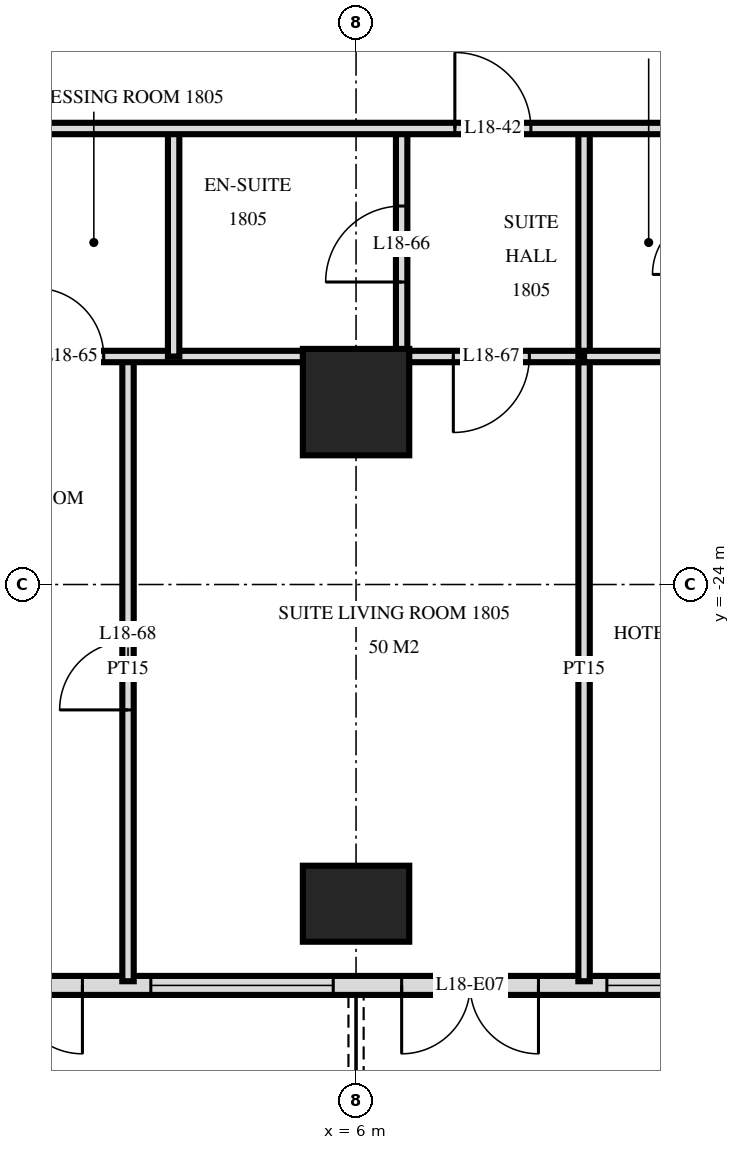
"""IFC4 building model, lengths in metres.
Left out: names, types, materials, properties, quantities, classifications, styles, units other than length and angle.
Written with IfcOpenShell. Run it as: python <this file> out.ifc"""

import sys

from ifc_helpers import new_model, si_unit, direction, frame, frame_2d, origin, origin_2d, place, context, subcontext, project, spatial, rectangle, extrude, element, fill, save


model = new_model("IFC4")
c1 = context("Model", 3, precision=1e-05, world=origin(), true_north=direction((0.0, 1.0)))
c2 = subcontext(c1, "Body", "Model", "MODEL_VIEW")
j1 = project(units=[si_unit("LENGTHUNIT", "METRE"), si_unit("PLANEANGLEUNIT", "RADIAN")], contexts=[c1])
p1 = place(None, origin())
s1 = spatial("IfcSite", under=j1, at=p1, CompositionType="ELEMENT")
p2 = place(p1, origin())
s2 = spatial("IfcBuilding", under=s1, at=p2, CompositionType="ELEMENT")
p3 = place(p2, frame((0.0, 0.0, 74.4)))
s3 = spatial("IfcBuildingStorey", under=s2, at=p3, CompositionType="ELEMENT", Elevation=74.4)
p4 = place(p3, frame((6.0, -28.2, 0.0), z_axis=(0.0, 0.0, 1.0), x_axis=(1.0, 0.0, 0.0)))
e1 = element("IfcColumn", 1, at=p4, inside=s3, PredefinedType="COLUMN", context=c2, shape_type="SweptSolid", body=[
    extrude(rectangle(XDim=1.4, YDim=1.0, at=origin_2d()), origin(), (0.0, 0.0, 1.0), 3.6),
])
p5 = place(p3, frame((6.0, -21.6, 0.0), z_axis=(0.0, 0.0, 1.0), x_axis=(1.0, 0.0, 0.0)))
e2 = element("IfcColumn", 2, at=p5, inside=s3, PredefinedType="COLUMN", context=c2, shape_type="SweptSolid", body=[
    extrude(rectangle(XDim=1.4, YDim=1.4, at=origin_2d()), origin(), (0.0, 0.0, 1.0), 3.6),
])
p6 = place(p3, frame((-28.775, -29.275, 0.0), z_axis=(0.0, 0.0, 1.0), x_axis=(1.0, 0.0, 0.0)))
e3 = element("IfcWall", 3, at=p6, inside=s3, PredefinedType="SOLIDWALL", context=c2, shape_type="SweptSolid", body=[
    extrude(rectangle(XDim=57.551, YDim=0.25, at=frame_2d((28.775, 0.0))), origin(), (0.0, 0.0, 1.0), 3.32),
])
p7 = place(p6, frame((0.575, 0.0, 0.0)))
e4 = element("IfcOpeningElement", 4, at=p7, cuts=e3, PredefinedType="OPENING", context=c2, shape_type="SweptSolid", body=[
    extrude(rectangle(XDim=1.8, YDim=2.4, at=frame_2d((0.9, 1.2))), frame((0.0, 0.135, 0.0), z_axis=(0.0, -1.0, 0.0), x_axis=(1.0, 0.0, 0.0)), (0.0, 0.0, 1.0), 0.27),
])
p8 = place(p6, frame((5.075, 0.0, 0.3)))
e5 = element("IfcOpeningElement", 5, at=p8, cuts=e3, PredefinedType="OPENING", context=c2, shape_type="SweptSolid", body=[
    extrude(rectangle(XDim=2.4, YDim=2.1, at=frame_2d((1.2, 1.05))), frame((0.0, 0.135, 0.0), z_axis=(0.0, -1.0, 0.0), x_axis=(1.0, 0.0, 0.0)), (0.0, 0.0, 1.0), 0.27),
])
p9 = place(p6, frame((8.375, 0.0, 0.0)))
e6 = element("IfcOpeningElement", 6, at=p9, cuts=e3, PredefinedType="OPENING", context=c2, shape_type="SweptSolid", body=[
    extrude(rectangle(XDim=1.8, YDim=2.4, at=frame_2d((0.9, 1.2))), frame((0.0, 0.135, 0.0), z_axis=(0.0, -1.0, 0.0), x_axis=(1.0, 0.0, 0.0)), (0.0, 0.0, 1.0), 0.27),
])
p10 = place(p6, frame((11.375, 0.0, 0.0)))
e7 = element("IfcOpeningElement", 7, at=p10, cuts=e3, PredefinedType="OPENING", context=c2, shape_type="SweptSolid", body=[
    extrude(rectangle(XDim=1.8, YDim=2.4, at=frame_2d((0.9, 1.2))), frame((0.0, 0.135, 0.0), z_axis=(0.0, -1.0, 0.0), x_axis=(1.0, 0.0, 0.0)), (0.0, 0.0, 1.0), 0.27),
])
p11 = place(p6, frame((14.075, 0.0, 0.3)))
e8 = element("IfcOpeningElement", 8, at=p11, cuts=e3, PredefinedType="OPENING", context=c2, shape_type="SweptSolid", body=[
    extrude(rectangle(XDim=2.4, YDim=2.1, at=frame_2d((1.2, 1.05))), frame((0.0, 0.135, 0.0), z_axis=(0.0, -1.0, 0.0), x_axis=(1.0, 0.0, 0.0)), (0.0, 0.0, 1.0), 0.27),
])
p12 = place(p6, frame((17.375, 0.0, 0.0)))
e9 = element("IfcOpeningElement", 9, at=p12, cuts=e3, PredefinedType="OPENING", context=c2, shape_type="SweptSolid", body=[
    extrude(rectangle(XDim=1.8, YDim=2.4, at=frame_2d((0.9, 1.2))), frame((0.0, 0.135, 0.0), z_axis=(0.0, -1.0, 0.0), x_axis=(1.0, 0.0, 0.0)), (0.0, 0.0, 1.0), 0.27),
])
p13 = place(p6, frame((20.075, 0.0, 0.3)))
e10 = element("IfcOpeningElement", 10, at=p13, cuts=e3, PredefinedType="OPENING", context=c2, shape_type="SweptSolid", body=[
    extrude(rectangle(XDim=2.4, YDim=2.1, at=frame_2d((1.2, 1.05))), frame((0.0, 0.135, 0.0), z_axis=(0.0, -1.0, 0.0), x_axis=(1.0, 0.0, 0.0)), (0.0, 0.0, 1.0), 0.27),
])
p14 = place(p6, frame((23.075, 0.0, 0.3)))
e11 = element("IfcOpeningElement", 11, at=p14, cuts=e3, PredefinedType="OPENING", context=c2, shape_type="SweptSolid", body=[
    extrude(rectangle(XDim=2.4, YDim=2.1, at=frame_2d((1.2, 1.05))), frame((0.0, 0.135, 0.0), z_axis=(0.0, -1.0, 0.0), x_axis=(1.0, 0.0, 0.0)), (0.0, 0.0, 1.0), 0.27),
])
p15 = place(p6, frame((26.375, 0.0, 0.0)))
e12 = element("IfcOpeningElement", 12, at=p15, cuts=e3, PredefinedType="OPENING", context=c2, shape_type="SweptSolid", body=[
    extrude(rectangle(XDim=1.8, YDim=2.4, at=frame_2d((0.9, 1.2))), frame((0.0, 0.135, 0.0), z_axis=(0.0, -1.0, 0.0), x_axis=(1.0, 0.0, 0.0)), (0.0, 0.0, 1.0), 0.27),
])
p16 = place(p6, frame((29.375, 0.0, 0.0)))
e13 = element("IfcOpeningElement", 13, at=p16, cuts=e3, PredefinedType="OPENING", context=c2, shape_type="SweptSolid", body=[
    extrude(rectangle(XDim=1.8, YDim=2.4, at=frame_2d((0.9, 1.2))), frame((0.0, 0.135, 0.0), z_axis=(0.0, -1.0, 0.0), x_axis=(1.0, 0.0, 0.0)), (0.0, 0.0, 1.0), 0.27),
])
p17 = place(p6, frame((32.075, 0.0, 0.3)))
e14 = element("IfcOpeningElement", 14, at=p17, cuts=e3, PredefinedType="OPENING", context=c2, shape_type="SweptSolid", body=[
    extrude(rectangle(XDim=2.4, YDim=2.1, at=frame_2d((1.2, 1.05))), frame((0.0, 0.135, 0.0), z_axis=(0.0, -1.0, 0.0), x_axis=(1.0, 0.0, 0.0)), (0.0, 0.0, 1.0), 0.27),
])
p18 = place(p6, frame((35.375, 0.0, 0.0)))
e15 = element("IfcOpeningElement", 15, at=p18, cuts=e3, PredefinedType="OPENING", context=c2, shape_type="SweptSolid", body=[
    extrude(rectangle(XDim=1.8, YDim=2.4, at=frame_2d((0.9, 1.2))), frame((0.0, 0.135, 0.0), z_axis=(0.0, -1.0, 0.0), x_axis=(1.0, 0.0, 0.0)), (0.0, 0.0, 1.0), 0.27),
])
p19 = place(p6, frame((38.075, 0.0, 0.3)))
e16 = element("IfcOpeningElement", 16, at=p19, cuts=e3, PredefinedType="OPENING", context=c2, shape_type="SweptSolid", body=[
    extrude(rectangle(XDim=2.4, YDim=2.1, at=frame_2d((1.2, 1.05))), frame((0.0, 0.135, 0.0), z_axis=(0.0, -1.0, 0.0), x_axis=(1.0, 0.0, 0.0)), (0.0, 0.0, 1.0), 0.27),
])
p20 = place(p6, frame((41.075, 0.0, 0.3)))
e17 = element("IfcOpeningElement", 17, at=p20, cuts=e3, PredefinedType="OPENING", context=c2, shape_type="SweptSolid", body=[
    extrude(rectangle(XDim=2.4, YDim=2.1, at=frame_2d((1.2, 1.05))), frame((0.0, 0.135, 0.0), z_axis=(0.0, -1.0, 0.0), x_axis=(1.0, 0.0, 0.0)), (0.0, 0.0, 1.0), 0.27),
])
p21 = place(p6, frame((44.375, 0.0, 0.0)))
e18 = element("IfcOpeningElement", 18, at=p21, cuts=e3, PredefinedType="OPENING", context=c2, shape_type="SweptSolid", body=[
    extrude(rectangle(XDim=1.8, YDim=2.4, at=frame_2d((0.9, 1.2))), frame((0.0, 0.135, 0.0), z_axis=(0.0, -1.0, 0.0), x_axis=(1.0, 0.0, 0.0)), (0.0, 0.0, 1.0), 0.27),
])
p22 = place(p6, frame((47.075, 0.0, 0.3)))
e19 = element("IfcOpeningElement", 19, at=p22, cuts=e3, PredefinedType="OPENING", context=c2, shape_type="SweptSolid", body=[
    extrude(rectangle(XDim=2.4, YDim=2.1, at=frame_2d((1.2, 1.05))), frame((0.0, 0.135, 0.0), z_axis=(0.0, -1.0, 0.0), x_axis=(1.0, 0.0, 0.0)), (0.0, 0.0, 1.0), 0.27),
])
p23 = place(p6, frame((50.375, 0.0, 0.0)))
e20 = element("IfcOpeningElement", 20, at=p23, cuts=e3, PredefinedType="OPENING", context=c2, shape_type="SweptSolid", body=[
    extrude(rectangle(XDim=1.8, YDim=2.4, at=frame_2d((0.9, 1.2))), frame((0.0, 0.135, 0.0), z_axis=(0.0, -1.0, 0.0), x_axis=(1.0, 0.0, 0.0)), (0.0, 0.0, 1.0), 0.27),
])
p24 = place(p6, frame((53.375, 0.0, 0.0)))
e21 = element("IfcOpeningElement", 21, at=p24, cuts=e3, PredefinedType="OPENING", context=c2, shape_type="SweptSolid", body=[
    extrude(rectangle(XDim=1.8, YDim=2.4, at=frame_2d((0.9, 1.2))), frame((0.0, 0.135, 0.0), z_axis=(0.0, -1.0, 0.0), x_axis=(1.0, 0.0, 0.0)), (0.0, 0.0, 1.0), 0.27),
])
p25 = place(p3, frame((9.0, -21.0, 0.0), z_axis=(0.0, 0.0, 1.0), x_axis=(0.0, 1.0, 0.0)))
e22 = element("IfcWall", 22, at=p25, inside=s3, PredefinedType="PARTITIONING", context=c2, shape_type="SweptSolid", body=[
    extrude(rectangle(XDim=3.0, YDim=0.15, at=frame_2d((1.5, 0.0))), origin(), (0.0, 0.0, 1.0), 3.32),
])
p26 = place(p3, frame((9.0, -29.22, 0.0), z_axis=(0.0, 0.0, 1.0), x_axis=(0.0, 1.0, 0.0)))
e23 = element("IfcWall", 23, at=p26, inside=s3, PredefinedType="PARTITIONING", context=c2, shape_type="SweptSolid", body=[
    extrude(rectangle(XDim=8.22, YDim=0.15, at=frame_2d((4.11, 0.0))), origin(), (0.0, 0.0, 1.0), 3.32),
])
p27 = place(p3, frame((6.6, -21.0, 0.0), z_axis=(0.0, 0.0, 1.0), x_axis=(0.0, 1.0, 0.0)))
e24 = element("IfcWall", 24, at=p27, inside=s3, PredefinedType="PARTITIONING", context=c2, shape_type="SweptSolid", body=[
    extrude(rectangle(XDim=3.0, YDim=0.15, at=frame_2d((1.5, 0.0))), origin(), (0.0, 0.0, 1.0), 3.32),
])
p28 = place(p27, frame((0.98, 0.0, 0.0)))
e25 = element("IfcOpeningElement", 25, at=p28, cuts=e24, PredefinedType="OPENING", context=c2, shape_type="SweptSolid", body=[
    extrude(rectangle(XDim=1.0, YDim=2.1, at=frame_2d((0.5, 1.05))), frame((0.0, 0.085, 0.0), z_axis=(0.0, -1.0, 0.0), x_axis=(1.0, 0.0, 0.0)), (0.0, 0.0, 1.0), 0.17),
])
p29 = place(p3, frame((3.6, -21.0, 0.0), z_axis=(0.0, 0.0, 1.0), x_axis=(0.0, 1.0, 0.0)))
e26 = element("IfcWall", 26, at=p29, inside=s3, PredefinedType="PARTITIONING", context=c2, shape_type="SweptSolid", body=[
    extrude(rectangle(XDim=3.0, YDim=0.15, at=frame_2d((1.5, 0.0))), origin(), (0.0, 0.0, 1.0), 3.32),
])
p30 = place(p3, frame((3.0, -29.22, 0.0), z_axis=(0.0, 0.0, 1.0), x_axis=(0.0, 1.0, 0.0)))
e27 = element("IfcWall", 27, at=p30, inside=s3, PredefinedType="PARTITIONING", context=c2, shape_type="SweptSolid", body=[
    extrude(rectangle(XDim=8.22, YDim=0.15, at=frame_2d((4.11, 0.0))), origin(), (0.0, 0.0, 1.0), 3.32),
])
p31 = place(p30, frame((3.57, 0.0, 0.0)))
e28 = element("IfcOpeningElement", 28, at=p31, cuts=e27, PredefinedType="OPENING", context=c2, shape_type="SweptSolid", body=[
    extrude(rectangle(XDim=0.9, YDim=2.1, at=frame_2d((0.45, 1.05))), frame((0.0, 0.085, 0.0), z_axis=(0.0, -1.0, 0.0), x_axis=(1.0, 0.0, 0.0)), (0.0, 0.0, 1.0), 0.17),
])
p32 = place(p3, frame((6.6, -21.0, 0.0), z_axis=(0.0, 0.0, 1.0), x_axis=(1.0, 0.0, 0.0)))
e29 = element("IfcWall", 29, at=p32, inside=s3, PredefinedType="PARTITIONING", context=c2, shape_type="SweptSolid", body=[
    extrude(rectangle(XDim=2.4, YDim=0.15, at=frame_2d((1.2, 0.0))), origin(), (0.0, 0.0, 1.0), 3.32),
])
p33 = place(p32, frame((0.68, 0.0, 0.0)))
e30 = element("IfcOpeningElement", 30, at=p33, cuts=e29, PredefinedType="OPENING", context=c2, shape_type="SweptSolid", body=[
    extrude(rectangle(XDim=1.0, YDim=2.1, at=frame_2d((0.5, 1.05))), frame((0.0, 0.085, 0.0), z_axis=(0.0, -1.0, 0.0), x_axis=(1.0, 0.0, 0.0)), (0.0, 0.0, 1.0), 0.17),
])
p34 = place(p3, frame((1.5, -21.0, 0.0), z_axis=(0.0, 0.0, 1.0), x_axis=(1.0, 0.0, 0.0)))
e31 = element("IfcWall", 31, at=p34, inside=s3, PredefinedType="PARTITIONING", context=c2, shape_type="SweptSolid", body=[
    extrude(rectangle(XDim=5.1, YDim=0.15, at=frame_2d((2.55, 0.0))), origin(), (0.0, 0.0, 1.0), 3.32),
])
p35 = place(p34, frame((0.28, 0.0, 0.0)))
e32 = element("IfcOpeningElement", 32, at=p35, cuts=e31, PredefinedType="OPENING", context=c2, shape_type="SweptSolid", body=[
    extrude(rectangle(XDim=0.9, YDim=2.1, at=frame_2d((0.45, 1.05))), frame((0.0, 0.085, 0.0), z_axis=(0.0, -1.0, 0.0), x_axis=(1.0, 0.0, 0.0)), (0.0, 0.0, 1.0), 0.17),
])
p36 = place(p3, frame((9.0, -21.0, 0.0), z_axis=(0.0, 0.0, 1.0), x_axis=(1.0, 0.0, 0.0)))
e33 = element("IfcWall", 33, at=p36, inside=s3, PredefinedType="PARTITIONING", context=c2, shape_type="SweptSolid", body=[
    extrude(rectangle(XDim=1.7, YDim=0.15, at=frame_2d((0.85, 0.0))), origin(), (0.0, 0.0, 1.0), 3.32),
])
p37 = place(p3, frame((-33.12, -18.0, 0.0), z_axis=(0.0, 0.0, 1.0), x_axis=(1.0, 0.0, 0.0)))
e34 = element("IfcWall", 34, at=p37, inside=s3, PredefinedType="PARTITIONING", context=c2, shape_type="SweptSolid", body=[
    extrude(rectangle(XDim=66.24, YDim=0.15, at=frame_2d((33.12, 0.0))), origin(), (0.0, 0.0, 1.0), 3.32),
])
p38 = place(p37, frame((15.27, 0.0, 0.0)))
e35 = element("IfcOpeningElement", 35, at=p38, cuts=e34, PredefinedType="OPENING", context=c2, shape_type="SweptSolid", body=[
    extrude(rectangle(XDim=1.0, YDim=2.1, at=frame_2d((0.5, 1.05))), frame((0.0, 0.085, 0.0), z_axis=(0.0, -1.0, 0.0), x_axis=(1.0, 0.0, 0.0)), (0.0, 0.0, 1.0), 0.17),
])
p39 = place(p37, frame((21.22, 0.0, 0.0)))
e36 = element("IfcOpeningElement", 36, at=p39, cuts=e34, PredefinedType="OPENING", context=c2, shape_type="SweptSolid", body=[
    extrude(rectangle(XDim=1.0, YDim=2.1, at=frame_2d((0.5, 1.05))), frame((0.0, 0.085, 0.0), z_axis=(0.0, -1.0, 0.0), x_axis=(1.0, 0.0, 0.0)), (0.0, 0.0, 1.0), 0.17),
])
p40 = place(p37, frame((24.27, 0.0, 0.0)))
e37 = element("IfcOpeningElement", 37, at=p40, cuts=e34, PredefinedType="OPENING", context=c2, shape_type="SweptSolid", body=[
    extrude(rectangle(XDim=1.0, YDim=2.1, at=frame_2d((0.5, 1.05))), frame((0.0, 0.085, 0.0), z_axis=(0.0, -1.0, 0.0), x_axis=(1.0, 0.0, 0.0)), (0.0, 0.0, 1.0), 0.17),
])
p41 = place(p37, frame((30.97, 0.0, 0.0)))
e38 = element("IfcOpeningElement", 38, at=p41, cuts=e34, PredefinedType="OPENING", context=c2, shape_type="SweptSolid", body=[
    extrude(rectangle(XDim=1.0, YDim=2.1, at=frame_2d((0.5, 1.05))), frame((0.0, 0.085, 0.0), z_axis=(0.0, -1.0, 0.0), x_axis=(1.0, 0.0, 0.0)), (0.0, 0.0, 1.0), 0.17),
])
p42 = place(p37, frame((40.42, 0.0, 0.0)))
e39 = element("IfcOpeningElement", 39, at=p42, cuts=e34, PredefinedType="OPENING", context=c2, shape_type="SweptSolid", body=[
    extrude(rectangle(XDim=1.0, YDim=2.1, at=frame_2d((0.5, 1.05))), frame((0.0, 0.085, 0.0), z_axis=(0.0, -1.0, 0.0), x_axis=(1.0, 0.0, 0.0)), (0.0, 0.0, 1.0), 0.17),
])
p43 = place(p37, frame((43.97, 0.0, 0.0)))
e40 = element("IfcOpeningElement", 40, at=p43, cuts=e34, PredefinedType="OPENING", context=c2, shape_type="SweptSolid", body=[
    extrude(rectangle(XDim=1.0, YDim=2.1, at=frame_2d((0.5, 1.05))), frame((0.0, 0.085, 0.0), z_axis=(0.0, -1.0, 0.0), x_axis=(1.0, 0.0, 0.0)), (0.0, 0.0, 1.0), 0.17),
])
p44 = place(p37, frame((45.52, 0.0, 0.0)))
e41 = element("IfcOpeningElement", 41, at=p44, cuts=e34, PredefinedType="OPENING", context=c2, shape_type="SweptSolid", body=[
    extrude(rectangle(XDim=1.0, YDim=2.1, at=frame_2d((0.5, 1.05))), frame((0.0, 0.085, 0.0), z_axis=(0.0, -1.0, 0.0), x_axis=(1.0, 0.0, 0.0)), (0.0, 0.0, 1.0), 0.17),
])
p45 = place(p37, frame((52.97, 0.0, 0.0)))
e42 = element("IfcOpeningElement", 42, at=p45, cuts=e34, PredefinedType="OPENING", context=c2, shape_type="SweptSolid", body=[
    extrude(rectangle(XDim=1.0, YDim=2.1, at=frame_2d((0.5, 1.05))), frame((0.0, 0.085, 0.0), z_axis=(0.0, -1.0, 0.0), x_axis=(1.0, 0.0, 0.0)), (0.0, 0.0, 1.0), 0.17),
])
p46 = place(p37, frame((54.27, 0.0, 0.0)))
e43 = element("IfcOpeningElement", 43, at=p46, cuts=e34, PredefinedType="OPENING", context=c2, shape_type="SweptSolid", body=[
    extrude(rectangle(XDim=1.0, YDim=2.1, at=frame_2d((0.5, 1.05))), frame((0.0, 0.085, 0.0), z_axis=(0.0, -1.0, 0.0), x_axis=(1.0, 0.0, 0.0)), (0.0, 0.0, 1.0), 0.17),
])
p47 = place(p37, frame((13.42, 0.0, 0.0)))
e44 = element("IfcOpeningElement", 44, at=p47, cuts=e34, PredefinedType="OPENING", context=c2, shape_type="SweptSolid", body=[
    extrude(rectangle(XDim=1.0, YDim=2.1, at=frame_2d((0.5, 1.05))), frame((0.0, 0.085, 0.0), z_axis=(0.0, -1.0, 0.0), x_axis=(1.0, 0.0, 0.0)), (0.0, 0.0, 1.0), 0.17),
])
p48 = place(p37, frame((60.82, 0.0, 0.0)))
e45 = element("IfcOpeningElement", 45, at=p48, cuts=e34, PredefinedType="OPENING", context=c2, shape_type="SweptSolid", body=[
    extrude(rectangle(XDim=1.0, YDim=2.1, at=frame_2d((0.5, 1.05))), frame((0.0, 0.085, 0.0), z_axis=(0.0, -1.0, 0.0), x_axis=(1.0, 0.0, 0.0)), (0.0, 0.0, 1.0), 0.17),
])
p49 = place(p16, frame((0.9, 0.0, 0.0), z_axis=(0.0, 0.0, 1.0), x_axis=(-1.0, 0.0, 0.0)))
e46 = element("IfcDoor", 46, at=p49, inside=s3, OperationType="DOUBLE_DOOR_SINGLE_SWING", PredefinedType="DOOR", context=c2, shape_type="SweptSolid", body=[
    extrude(rectangle(XDim=1.8, YDim=2.4, at=frame_2d((0.0, 1.2))), frame((0.0, -0.025, 0.0), z_axis=(0.0, 1.0, 0.0), x_axis=(-1.0, 0.0, 0.0)), (0.0, 0.0, 1.0), 0.05),
])
fill(e13, e46)
p50 = place(p17, origin())
e47 = element("IfcWindow", 47, at=p50, inside=s3, PartitioningType="SINGLE_PANEL", PredefinedType="WINDOW", context=c2, shape_type="SweptSolid", body=[
    extrude(rectangle(XDim=2.4, YDim=2.1, at=frame_2d((1.2, 1.05))), frame((0.0, 0.03, 0.0), z_axis=(0.0, -1.0, 0.0), x_axis=(1.0, 0.0, 0.0)), (0.0, 0.0, 1.0), 0.06),
])
fill(e14, e47)
p51 = place(p18, frame((0.9, 0.0, 0.0), z_axis=(0.0, 0.0, 1.0), x_axis=(-1.0, 0.0, 0.0)))
e48 = element("IfcDoor", 48, at=p51, inside=s3, OperationType="DOUBLE_DOOR_SINGLE_SWING", PredefinedType="DOOR", context=c2, shape_type="SweptSolid", body=[
    extrude(rectangle(XDim=1.8, YDim=2.4, at=frame_2d((0.0, 1.2))), frame((0.0, -0.025, 0.0), z_axis=(0.0, 1.0, 0.0), x_axis=(-1.0, 0.0, 0.0)), (0.0, 0.0, 1.0), 0.05),
])
fill(e15, e48)
p52 = place(p19, origin())
e49 = element("IfcWindow", 49, at=p52, inside=s3, PartitioningType="SINGLE_PANEL", PredefinedType="WINDOW", context=c2, shape_type="SweptSolid", body=[
    extrude(rectangle(XDim=2.4, YDim=2.1, at=frame_2d((1.2, 1.05))), frame((0.0, 0.03, 0.0), z_axis=(0.0, -1.0, 0.0), x_axis=(1.0, 0.0, 0.0)), (0.0, 0.0, 1.0), 0.06),
])
fill(e16, e49)
p53 = place(p42, origin())
e50 = element("IfcDoor", 50, at=p53, inside=s3, OperationType="SINGLE_SWING_RIGHT", PredefinedType="DOOR", context=c2, shape_type="SweptSolid", body=[
    extrude(rectangle(XDim=1.0, YDim=2.1, at=frame_2d((0.5, 1.05))), frame((0.0, 0.025, 0.0), z_axis=(0.0, -1.0, 0.0), x_axis=(1.0, 0.0, 0.0)), (0.0, 0.0, 1.0), 0.05),
])
fill(e39, e50)
p54 = place(p35, origin())
e51 = element("IfcDoor", 51, at=p54, inside=s3, OperationType="SINGLE_SWING_RIGHT", PredefinedType="DOOR", context=c2, shape_type="SweptSolid", body=[
    extrude(rectangle(XDim=0.9, YDim=2.1, at=frame_2d((0.45, 1.05))), frame((0.0, 0.025, 0.0), z_axis=(0.0, -1.0, 0.0), x_axis=(1.0, 0.0, 0.0)), (0.0, 0.0, 1.0), 0.05),
])
fill(e32, e51)
p55 = place(p28, origin())
e52 = element("IfcDoor", 52, at=p55, inside=s3, OperationType="SINGLE_SWING_RIGHT", PredefinedType="DOOR", context=c2, shape_type="SweptSolid", body=[
    extrude(rectangle(XDim=1.0, YDim=2.1, at=frame_2d((0.5, 1.05))), frame((0.0, 0.025, 0.0), z_axis=(0.0, -1.0, 0.0), x_axis=(1.0, 0.0, 0.0)), (0.0, 0.0, 1.0), 0.05),
])
fill(e25, e52)
p56 = place(p33, frame((0.5, 0.0, 0.0), z_axis=(0.0, 0.0, 1.0), x_axis=(-1.0, 0.0, 0.0)))
e53 = element("IfcDoor", 53, at=p56, inside=s3, OperationType="SINGLE_SWING_LEFT", PredefinedType="DOOR", context=c2, shape_type="SweptSolid", body=[
    extrude(rectangle(XDim=1.0, YDim=2.1, at=frame_2d((0.0, 1.05))), frame((0.0, -0.025, 0.0), z_axis=(0.0, 1.0, 0.0), x_axis=(-1.0, 0.0, 0.0)), (0.0, 0.0, 1.0), 0.05),
])
fill(e30, e53)
p57 = place(p31, origin())
e54 = element("IfcDoor", 54, at=p57, inside=s3, OperationType="SINGLE_SWING_RIGHT", PredefinedType="DOOR", context=c2, shape_type="SweptSolid", body=[
    extrude(rectangle(XDim=0.9, YDim=2.1, at=frame_2d((0.45, 1.05))), frame((0.0, 0.025, 0.0), z_axis=(0.0, -1.0, 0.0), x_axis=(1.0, 0.0, 0.0)), (0.0, 0.0, 1.0), 0.05),
])
fill(e28, e54)
save(model, sys.argv[1])
